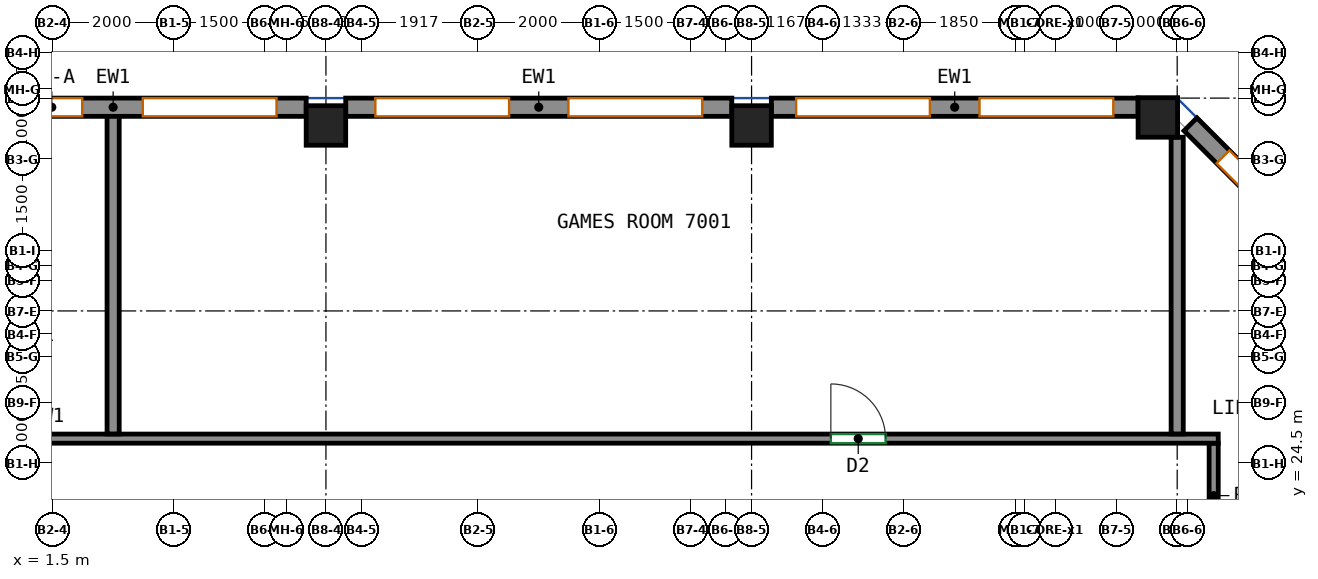
"""IFC4 building model, lengths in metres.
Left out: names, types, materials, properties, quantities, classifications, styles, units other than length and angle.
Written with IfcOpenShell. Run it as: python <this file> out.ifc"""

import sys

from ifc_helpers import new_model, si_unit, direction, frame, frame_2d, origin, origin_2d, place, context, subcontext, project, spatial, rectangle, extrude, source, transform, mapped, element, fill, save


model = new_model("IFC4")
c1 = context("Model", 3, precision=1e-05, world=origin(), true_north=direction((0.0, 1.0)))
c2 = subcontext(c1, "Body", "Model", "MODEL_VIEW")
j1 = project(units=[si_unit("LENGTHUNIT", "METRE"), si_unit("PLANEANGLEUNIT", "RADIAN")], contexts=[c1])
p1 = place(None, origin())
s1 = spatial("IfcSite", under=j1, at=p1, CompositionType="ELEMENT")
p2 = place(p1, origin())
s2 = spatial("IfcBuilding", under=s1, at=p2, CompositionType="ELEMENT")
p3 = place(p2, frame((0.0, 0.0, 284.0)))
s3 = spatial("IfcBuildingStorey", under=s2, at=p3, CompositionType="ELEMENT", Elevation=284.0)
m1 = source(origin(), c2, "Body", "SweptSolid", [
    extrude(rectangle(XDim=0.65, YDim=0.65, at=origin_2d()), origin(), (0.0, 0.0, 1.0), 3.12),
])
for number, where, z_axis, x_axis in (
    (1, (6.0, 30.05, 0.0), (0.0, 0.0, 1.0), (1.0, 0.0, 0.0)),
    (2, (13.0, 30.05, 0.0), (0.0, 0.0, 1.0), (1.0, 0.0, 0.0)),
    (3, (19.682, 30.182, 0.0), (0.0, 0.0, 1.0), (1.0, 0.0, 0.0)),
):
    element("IfcColumn", number, at=place(p3, frame(where, z_axis=z_axis, x_axis=x_axis)), inside=s3, PredefinedType="COLUMN", context=c2, shape_type="MappedRepresentation", body=[
        mapped(m1, transform((0.0, 0.0, 0.0))),
    ])
m2 = source(origin(), c2, "Body", "SweptSolid", [
    extrude(rectangle(XDim=3.712, YDim=0.3, at=frame_2d((1.856, 0.0))), origin(), (0.0, 0.0, 1.0), 3.12),
])
p4 = place(p3, frame((22.844, 27.444, 0.0), z_axis=(0.0, 0.0, 1.0), x_axis=(-0.707106781187, 0.707106781187, 0.0)))
e4 = element("IfcWall", 4, at=p4, inside=s3, PredefinedType="SOLIDWALL", context=c2, shape_type="MappedRepresentation", body=[
    mapped(m2, transform((0.0, 0.0, 0.0))),
])
p5 = place(p4, frame((0.756, 0.0, 0.8)))
e5 = element("IfcOpeningElement", 5, at=p5, cuts=e4, PredefinedType="OPENING", context=c2, shape_type="SweptSolid", body=[
    extrude(rectangle(XDim=2.2, YDim=2.05, at=frame_2d((1.1, 1.025))), frame((0.0, 0.16, 0.0), z_axis=(0.0, -1.0, 0.0), x_axis=(1.0, 0.0, 0.0)), (0.0, 0.0, 1.0), 0.32),
])
m3 = source(origin(), c2, "Body", "SweptSolid", [
    extrude(rectangle(XDim=6.032, YDim=0.3, at=frame_2d((3.016, 0.0))), origin(), (0.0, 0.0, 1.0), 3.12),
])
p6 = place(p3, frame((19.357, 30.35, 0.0), z_axis=(0.0, 0.0, 1.0), x_axis=(-1.0, 0.0, 0.0)))
e6 = element("IfcWall", 6, at=p6, inside=s3, PredefinedType="SOLIDWALL", context=c2, shape_type="MappedRepresentation", body=[
    mapped(m3, transform((0.0, 0.0, 0.0))),
])
p7 = place(p6, frame((0.408, 0.0, 0.8)))
e7 = element("IfcOpeningElement", 7, at=p7, cuts=e6, PredefinedType="OPENING", context=c2, shape_type="SweptSolid", body=[
    extrude(rectangle(XDim=2.2, YDim=2.05, at=frame_2d((1.1, 1.025))), frame((0.0, 0.16, 0.0), z_axis=(0.0, -1.0, 0.0), x_axis=(1.0, 0.0, 0.0)), (0.0, 0.0, 1.0), 0.32),
])
p8 = place(p6, frame((3.424, 0.0, 0.8)))
e8 = element("IfcOpeningElement", 8, at=p8, cuts=e6, PredefinedType="OPENING", context=c2, shape_type="SweptSolid", body=[
    extrude(rectangle(XDim=2.2, YDim=2.05, at=frame_2d((1.1, 1.025))), frame((0.0, 0.16, 0.0), z_axis=(0.0, -1.0, 0.0), x_axis=(1.0, 0.0, 0.0)), (0.0, 0.0, 1.0), 0.32),
])
m4 = source(origin(), c2, "Body", "SweptSolid", [
    extrude(rectangle(XDim=6.35, YDim=0.3, at=frame_2d((3.175, 0.0))), origin(), (0.0, 0.0, 1.0), 3.12),
])
p9 = place(p3, frame((12.675, 30.35, 0.0), z_axis=(0.0, 0.0, 1.0), x_axis=(-1.0, 0.0, 0.0)))
e9 = element("IfcWall", 9, at=p9, inside=s3, PredefinedType="SOLIDWALL", context=c2, shape_type="MappedRepresentation", body=[
    mapped(m4, transform((0.0, 0.0, 0.0))),
])
p10 = place(p9, frame((0.488, 0.0, 0.8)))
e10 = element("IfcOpeningElement", 10, at=p10, cuts=e9, PredefinedType="OPENING", context=c2, shape_type="SweptSolid", body=[
    extrude(rectangle(XDim=2.2, YDim=2.05, at=frame_2d((1.1, 1.025))), frame((0.0, 0.16, 0.0), z_axis=(0.0, -1.0, 0.0), x_axis=(1.0, 0.0, 0.0)), (0.0, 0.0, 1.0), 0.32),
])
p11 = place(p9, frame((3.663, 0.0, 0.8)))
e11 = element("IfcOpeningElement", 11, at=p11, cuts=e9, PredefinedType="OPENING", context=c2, shape_type="SweptSolid", body=[
    extrude(rectangle(XDim=2.2, YDim=2.05, at=frame_2d((1.1, 1.025))), frame((0.0, 0.16, 0.0), z_axis=(0.0, -1.0, 0.0), x_axis=(1.0, 0.0, 0.0)), (0.0, 0.0, 1.0), 0.32),
])
p12 = place(p3, frame((5.675, 30.35, 0.0), z_axis=(0.0, 0.0, 1.0), x_axis=(-1.0, 0.0, 0.0)))
e12 = element("IfcWall", 12, at=p12, inside=s3, PredefinedType="SOLIDWALL", context=c2, shape_type="MappedRepresentation", body=[
    mapped(m4, transform((0.0, 0.0, 0.0))),
])
p13 = place(p12, frame((0.488, 0.0, 0.8)))
e13 = element("IfcOpeningElement", 13, at=p13, cuts=e12, PredefinedType="OPENING", context=c2, shape_type="SweptSolid", body=[
    extrude(rectangle(XDim=2.2, YDim=2.05, at=frame_2d((1.1, 1.025))), frame((0.0, 0.16, 0.0), z_axis=(0.0, -1.0, 0.0), x_axis=(1.0, 0.0, 0.0)), (0.0, 0.0, 1.0), 0.32),
])
p14 = place(p12, frame((3.684, 0.0, 0.8)))
e14 = element("IfcOpeningElement", 14, at=p14, cuts=e12, PredefinedType="OPENING", context=c2, shape_type="SweptSolid", body=[
    extrude(rectangle(XDim=1.0, YDim=2.05, at=frame_2d((0.5, 1.025))), frame((0.0, 0.16, 0.0), z_axis=(0.0, -1.0, 0.0), x_axis=(1.0, 0.0, 0.0)), (0.0, 0.0, 1.0), 0.32),
])
p15 = place(p12, frame((5.009, 0.0, 0.8)))
e15 = element("IfcOpeningElement", 15, at=p15, cuts=e12, PredefinedType="OPENING", context=c2, shape_type="SweptSolid", body=[
    extrude(rectangle(XDim=0.85, YDim=2.05, at=frame_2d((0.425, 1.025))), frame((0.0, 0.16, 0.0), z_axis=(0.0, -1.0, 0.0), x_axis=(1.0, 0.0, 0.0)), (0.0, 0.0, 1.0), 0.32),
])
p16 = place(p3, frame((20.6, 23.1, 0.0), z_axis=(0.0, 0.0, 1.0), x_axis=(0.0, 1.0, 0.0)))
e16 = element("IfcWall", 16, at=p16, inside=s3, PredefinedType="PARTITIONING", context=c2, shape_type="SweptSolid", body=[
    extrude(rectangle(XDim=1.725, YDim=0.15, at=frame_2d((0.862, 0.0))), origin(), (0.0, 0.0, 1.0), 3.12),
])
p17 = place(p3, frame((-19.075, 24.9, 0.0), z_axis=(0.0, 0.0, 1.0), x_axis=(1.0, 0.0, 0.0)))
e17 = element("IfcWall", 17, at=p17, inside=s3, PredefinedType="PARTITIONING", context=c2, shape_type="SweptSolid", body=[
    extrude(rectangle(XDim=39.75, YDim=0.15, at=frame_2d((19.875, 0.0))), origin(), (0.0, 0.0, 1.0), 3.12),
])
p18 = place(p17, frame((11.365, 0.0, 0.0)))
e18 = element("IfcOpeningElement", 18, at=p18, cuts=e17, PredefinedType="OPENING", context=c2, shape_type="SweptSolid", body=[
    extrude(rectangle(XDim=1.0, YDim=2.1, at=frame_2d((0.5, 1.05))), frame((0.0, 0.085, 0.0), z_axis=(0.0, -1.0, 0.0), x_axis=(1.0, 0.0, 0.0)), (0.0, 0.0, 1.0), 0.17),
])
p19 = place(p17, frame((33.379, 0.0, 0.0)))
e19 = element("IfcOpeningElement", 19, at=p19, cuts=e17, PredefinedType="OPENING", context=c2, shape_type="SweptSolid", body=[
    extrude(rectangle(XDim=0.9, YDim=2.1, at=frame_2d((0.45, 1.05))), frame((0.0, 0.085, 0.0), z_axis=(0.0, -1.0, 0.0), x_axis=(1.0, 0.0, 0.0)), (0.0, 0.0, 1.0), 0.17),
])
p20 = place(p3, frame((20.0, 29.857, 0.0), z_axis=(0.0, 0.0, 1.0), x_axis=(0.0, -1.0, 0.0)))
e20 = element("IfcWall", 20, at=p20, inside=s3, PredefinedType="PARTITIONING", context=c2, shape_type="SweptSolid", body=[
    extrude(rectangle(XDim=4.88, YDim=0.2, at=frame_2d((2.44, 0.0))), origin(), (0.0, 0.0, 1.0), 3.12),
])
p21 = place(p3, frame((2.5, 30.25, 0.0), z_axis=(0.0, 0.0, 1.0), x_axis=(0.0, -1.0, 0.0)))
e21 = element("IfcWall", 21, at=p21, inside=s3, PredefinedType="PARTITIONING", context=c2, shape_type="SweptSolid", body=[
    extrude(rectangle(XDim=5.273, YDim=0.2, at=frame_2d((2.636, 0.0))), origin(), (0.0, 0.0, 1.0), 3.12),
])
p22 = place(p5, origin())
e22 = element("IfcWindow", 22, at=p22, inside=s3, PartitioningType="SINGLE_PANEL", PredefinedType="WINDOW", context=c2, shape_type="SweptSolid", body=[
    extrude(rectangle(XDim=2.2, YDim=2.05, at=frame_2d((1.1, 1.025))), frame((0.0, 0.03, 0.0), z_axis=(0.0, -1.0, 0.0), x_axis=(1.0, 0.0, 0.0)), (0.0, 0.0, 1.0), 0.06),
])
fill(e5, e22)
p23 = place(p7, origin())
e23 = element("IfcWindow", 23, at=p23, inside=s3, PartitioningType="SINGLE_PANEL", PredefinedType="WINDOW", context=c2, shape_type="SweptSolid", body=[
    extrude(rectangle(XDim=2.2, YDim=2.05, at=frame_2d((1.1, 1.025))), frame((0.0, 0.03, 0.0), z_axis=(0.0, -1.0, 0.0), x_axis=(1.0, 0.0, 0.0)), (0.0, 0.0, 1.0), 0.06),
])
fill(e7, e23)
p24 = place(p8, origin())
e24 = element("IfcWindow", 24, at=p24, inside=s3, PartitioningType="SINGLE_PANEL", PredefinedType="WINDOW", context=c2, shape_type="SweptSolid", body=[
    extrude(rectangle(XDim=2.2, YDim=2.05, at=frame_2d((1.1, 1.025))), frame((0.0, 0.03, 0.0), z_axis=(0.0, -1.0, 0.0), x_axis=(1.0, 0.0, 0.0)), (0.0, 0.0, 1.0), 0.06),
])
fill(e8, e24)
p25 = place(p10, origin())
e25 = element("IfcWindow", 25, at=p25, inside=s3, PartitioningType="SINGLE_PANEL", PredefinedType="WINDOW", context=c2, shape_type="SweptSolid", body=[
    extrude(rectangle(XDim=2.2, YDim=2.05, at=frame_2d((1.1, 1.025))), frame((0.0, 0.03, 0.0), z_axis=(0.0, -1.0, 0.0), x_axis=(1.0, 0.0, 0.0)), (0.0, 0.0, 1.0), 0.06),
])
fill(e10, e25)
p26 = place(p11, origin())
e26 = element("IfcWindow", 26, at=p26, inside=s3, PartitioningType="SINGLE_PANEL", PredefinedType="WINDOW", context=c2, shape_type="SweptSolid", body=[
    extrude(rectangle(XDim=2.2, YDim=2.05, at=frame_2d((1.1, 1.025))), frame((0.0, 0.03, 0.0), z_axis=(0.0, -1.0, 0.0), x_axis=(1.0, 0.0, 0.0)), (0.0, 0.0, 1.0), 0.06),
])
fill(e11, e26)
p27 = place(p13, origin())
e27 = element("IfcWindow", 27, at=p27, inside=s3, PartitioningType="SINGLE_PANEL", PredefinedType="WINDOW", context=c2, shape_type="SweptSolid", body=[
    extrude(rectangle(XDim=2.2, YDim=2.05, at=frame_2d((1.1, 1.025))), frame((0.0, 0.03, 0.0), z_axis=(0.0, -1.0, 0.0), x_axis=(1.0, 0.0, 0.0)), (0.0, 0.0, 1.0), 0.06),
])
fill(e13, e27)
p28 = place(p14, origin())
e28 = element("IfcWindow", 28, at=p28, inside=s3, PartitioningType="SINGLE_PANEL", PredefinedType="WINDOW", context=c2, shape_type="SweptSolid", body=[
    extrude(rectangle(XDim=1.0, YDim=2.05, at=frame_2d((0.5, 1.025))), frame((0.0, 0.03, 0.0), z_axis=(0.0, -1.0, 0.0), x_axis=(1.0, 0.0, 0.0)), (0.0, 0.0, 1.0), 0.06),
])
fill(e14, e28)
p29 = place(p19, origin())
e29 = element("IfcDoor", 29, at=p29, inside=s3, OperationType="SINGLE_SWING_LEFT", PredefinedType="DOOR", context=c2, shape_type="SweptSolid", body=[
    extrude(rectangle(XDim=0.9, YDim=2.1, at=frame_2d((0.45, 1.05))), frame((0.0, 0.025, 0.0), z_axis=(0.0, -1.0, 0.0), x_axis=(1.0, 0.0, 0.0)), (0.0, 0.0, 1.0), 0.05),
])
fill(e19, e29)
save(model, sys.argv[1])
